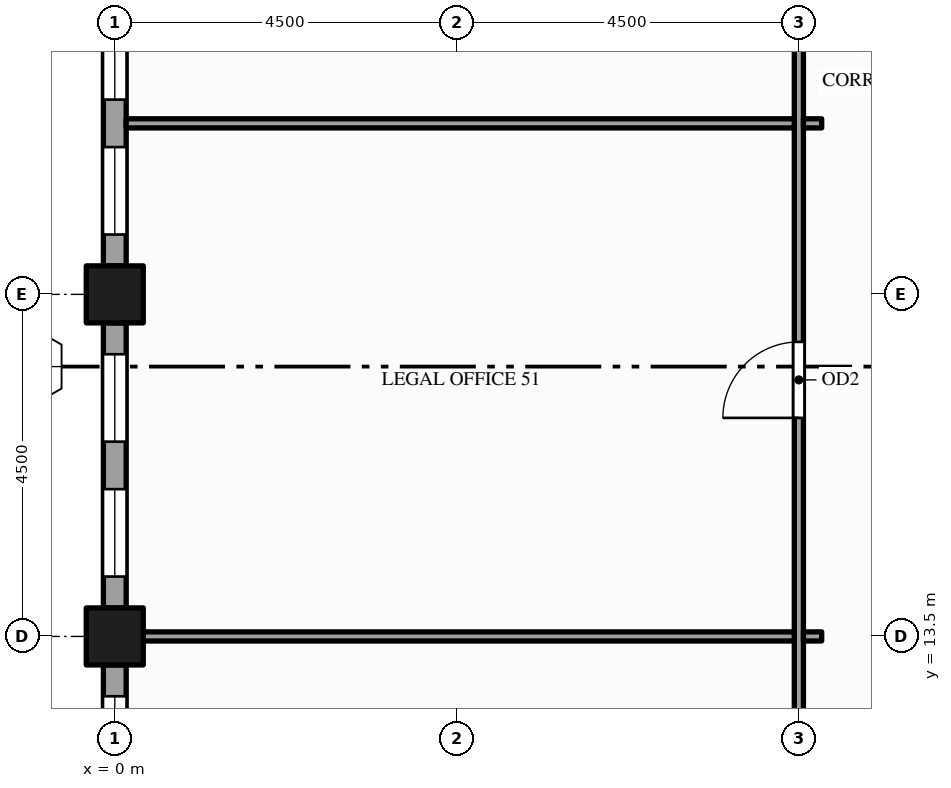
"""IFC4 building model, lengths in metres.
Left out: names, types, materials, properties, quantities, classifications, styles, units other than length and angle.
Written with IfcOpenShell. Run it as: python <this file> out.ifc"""

import sys

from ifc_helpers import new_model, si_unit, direction, frame, frame_2d, origin, origin_2d, place, context, subcontext, project, spatial, rectangle, hollow_rectangle, extrude, element, fill, save


model = new_model("IFC4")
c1 = context("Model", 3, precision=1e-05, world=origin(), true_north=direction((0.0, 1.0)))
c2 = subcontext(c1, "Body", "Model", "MODEL_VIEW")
j1 = project(units=[si_unit("LENGTHUNIT", "METRE"), si_unit("PLANEANGLEUNIT", "RADIAN")], contexts=[c1])
p1 = place(None, origin())
s1 = spatial("IfcSite", under=j1, at=p1, CompositionType="ELEMENT")
p2 = place(p1, origin())
s2 = spatial("IfcBuilding", under=s1, at=p2, CompositionType="ELEMENT")
p3 = place(p2, frame((0.0, 0.0, 223.0)))
s3 = spatial("IfcBuildingStorey", under=s2, at=p3, CompositionType="ELEMENT", Elevation=223.0)
for number, where, z_axis, x_axis in (
    (1, (0.0, 13.5, -0.15), (0.0, 0.0, 1.0), (1.0, 0.0, 0.0)),
    (2, (0.0, 18.0, -0.15), (0.0, 0.0, 1.0), (1.0, 0.0, 0.0)),
):
    element("IfcColumn", number, at=place(p3, frame(where, z_axis=z_axis, x_axis=x_axis)), inside=s3, PredefinedType="COLUMN", context=c2, shape_type="SweptSolid", body=[
        extrude(hollow_rectangle(XDim=0.75, YDim=0.75, WallThickness=0.036, at=origin_2d()), origin(), (0.0, 0.0, 1.0), 4.0),
    ])
p4 = place(p3, frame((0.0, 22.125, 0.0), z_axis=(0.0, 0.0, 1.0), x_axis=(0.0, -1.0, 0.0)))
e3 = element("IfcWall", 3, at=p4, inside=s3, PredefinedType="STANDARD", context=c2, shape_type="SweptSolid", body=[
    extrude(rectangle(XDim=3.75, YDim=0.3, at=frame_2d((1.875, 0.0))), origin(), (0.0, 0.0, 1.0), 3.157),
])
p5 = place(p4, frame((0.413, 0.0, 0.9)))
e4 = element("IfcOpeningElement", 4, at=p5, cuts=e3, PredefinedType="OPENING", context=c2, shape_type="SweptSolid", body=[
    extrude(rectangle(XDim=1.15, YDim=2.0, at=frame_2d((0.575, 1.0))), frame((0.0, 0.16, 0.0), z_axis=(0.0, -1.0, 0.0), x_axis=(1.0, 0.0, 0.0)), (0.0, 0.0, 1.0), 0.32),
])
p6 = place(p4, frame((2.188, 0.0, 0.9)))
e5 = element("IfcOpeningElement", 5, at=p6, cuts=e3, PredefinedType="OPENING", context=c2, shape_type="SweptSolid", body=[
    extrude(rectangle(XDim=1.15, YDim=2.0, at=frame_2d((0.575, 1.0))), frame((0.0, 0.16, 0.0), z_axis=(0.0, -1.0, 0.0), x_axis=(1.0, 0.0, 0.0)), (0.0, 0.0, 1.0), 0.32),
])
p7 = place(p3, frame((0.0, 17.625, 0.0), z_axis=(0.0, 0.0, 1.0), x_axis=(0.0, -1.0, 0.0)))
e6 = element("IfcWall", 6, at=p7, inside=s3, PredefinedType="STANDARD", context=c2, shape_type="SweptSolid", body=[
    extrude(rectangle(XDim=3.75, YDim=0.3, at=frame_2d((1.875, 0.0))), origin(), (0.0, 0.0, 1.0), 3.157),
])
p8 = place(p7, frame((0.413, 0.0, 0.9)))
e7 = element("IfcOpeningElement", 7, at=p8, cuts=e6, PredefinedType="OPENING", context=c2, shape_type="SweptSolid", body=[
    extrude(rectangle(XDim=1.15, YDim=2.0, at=frame_2d((0.575, 1.0))), frame((0.0, 0.16, 0.0), z_axis=(0.0, -1.0, 0.0), x_axis=(1.0, 0.0, 0.0)), (0.0, 0.0, 1.0), 0.32),
])
p9 = place(p7, frame((2.188, 0.0, 0.9)))
e8 = element("IfcOpeningElement", 8, at=p9, cuts=e6, PredefinedType="OPENING", context=c2, shape_type="SweptSolid", body=[
    extrude(rectangle(XDim=1.15, YDim=2.0, at=frame_2d((0.575, 1.0))), frame((0.0, 0.16, 0.0), z_axis=(0.0, -1.0, 0.0), x_axis=(1.0, 0.0, 0.0)), (0.0, 0.0, 1.0), 0.32),
])
p10 = place(p3, frame((0.0, 13.125, 0.0), z_axis=(0.0, 0.0, 1.0), x_axis=(0.0, -1.0, 0.0)))
e9 = element("IfcWall", 9, at=p10, inside=s3, PredefinedType="STANDARD", context=c2, shape_type="SweptSolid", body=[
    extrude(rectangle(XDim=3.75, YDim=0.3, at=frame_2d((1.875, 0.0))), origin(), (0.0, 0.0, 1.0), 3.157),
])
p11 = place(p10, frame((0.413, 0.0, 0.9)))
e10 = element("IfcOpeningElement", 10, at=p11, cuts=e9, PredefinedType="OPENING", context=c2, shape_type="SweptSolid", body=[
    extrude(rectangle(XDim=1.15, YDim=2.0, at=frame_2d((0.575, 1.0))), frame((0.0, 0.16, 0.0), z_axis=(0.0, -1.0, 0.0), x_axis=(1.0, 0.0, 0.0)), (0.0, 0.0, 1.0), 0.32),
])
p12 = place(p10, frame((2.188, 0.0, 0.9)))
e11 = element("IfcOpeningElement", 11, at=p12, cuts=e9, PredefinedType="OPENING", context=c2, shape_type="SweptSolid", body=[
    extrude(rectangle(XDim=1.15, YDim=2.0, at=frame_2d((0.575, 1.0))), frame((0.0, 0.16, 0.0), z_axis=(0.0, -1.0, 0.0), x_axis=(1.0, 0.0, 0.0)), (0.0, 0.0, 1.0), 0.32),
])
p13 = place(p3, frame((9.0, 8.7, 0.0), z_axis=(0.0, 0.0, 1.0), x_axis=(0.0, 1.0, 0.0)))
e12 = element("IfcWall", 12, at=p13, inside=s3, PredefinedType="PARTITIONING", context=c2, shape_type="SweptSolid", body=[
    extrude(rectangle(XDim=23.1, YDim=0.12, at=frame_2d((11.55, 0.0))), origin(), (0.0, 0.0, 1.0), 2.6),
])
p14 = place(p13, frame((2.05, 0.0, 0.0)))
e13 = element("IfcOpeningElement", 13, at=p14, cuts=e12, PredefinedType="OPENING", context=c2, shape_type="SweptSolid", body=[
    extrude(rectangle(XDim=1.0, YDim=2.1, at=frame_2d((0.5, 1.05))), frame((0.0, 0.07, 0.0), z_axis=(0.0, -1.0, 0.0), x_axis=(1.0, 0.0, 0.0)), (0.0, 0.0, 1.0), 0.14),
])
p15 = place(p13, frame((7.675, 0.0, 0.0)))
e14 = element("IfcOpeningElement", 14, at=p15, cuts=e12, PredefinedType="OPENING", context=c2, shape_type="SweptSolid", body=[
    extrude(rectangle(XDim=1.0, YDim=2.1, at=frame_2d((0.5, 1.05))), frame((0.0, 0.07, 0.0), z_axis=(0.0, -1.0, 0.0), x_axis=(1.0, 0.0, 0.0)), (0.0, 0.0, 1.0), 0.14),
])
p16 = place(p13, frame((14.455, 0.0, 0.0)))
e15 = element("IfcOpeningElement", 15, at=p16, cuts=e12, PredefinedType="OPENING", context=c2, shape_type="SweptSolid", body=[
    extrude(rectangle(XDim=1.0, YDim=2.1, at=frame_2d((0.5, 1.05))), frame((0.0, 0.07, 0.0), z_axis=(0.0, -1.0, 0.0), x_axis=(1.0, 0.0, 0.0)), (0.0, 0.0, 1.0), 0.14),
])
p17 = place(p3, frame((0.15, 13.5, 0.0), z_axis=(0.0, 0.0, 1.0), x_axis=(1.0, 0.0, 0.0)))
e16 = element("IfcWall", 16, at=p17, inside=s3, PredefinedType="PARTITIONING", context=c2, shape_type="SweptSolid", body=[
    extrude(rectangle(XDim=8.79, YDim=0.12, at=frame_2d((4.395, 0.0))), origin(), (0.0, 0.0, 1.0), 2.87),
])
p18 = place(p3, frame((9.06, 13.5, 0.0), z_axis=(0.0, 0.0, 1.0), x_axis=(1.0, 0.0, 0.0)))
e17 = element("IfcWall", 17, at=p18, inside=s3, PredefinedType="PARTITIONING", context=c2, shape_type="SweptSolid", body=[
    extrude(rectangle(XDim=0.24, YDim=0.12, at=frame_2d((0.12, 0.0))), origin(), (0.0, 0.0, 1.0), 2.87),
])
p19 = place(p3, frame((0.15, 20.25, 0.0), z_axis=(0.0, 0.0, 1.0), x_axis=(1.0, 0.0, 0.0)))
e18 = element("IfcWall", 18, at=p19, inside=s3, PredefinedType="PARTITIONING", context=c2, shape_type="SweptSolid", body=[
    extrude(rectangle(XDim=8.79, YDim=0.12, at=frame_2d((4.395, 0.0))), origin(), (0.0, 0.0, 1.0), 2.87),
])
p20 = place(p3, frame((9.06, 20.25, 0.0), z_axis=(0.0, 0.0, 1.0), x_axis=(1.0, 0.0, 0.0)))
e19 = element("IfcWall", 19, at=p20, inside=s3, PredefinedType="PARTITIONING", context=c2, shape_type="SweptSolid", body=[
    extrude(rectangle(XDim=0.24, YDim=0.12, at=frame_2d((0.12, 0.0))), origin(), (0.0, 0.0, 1.0), 2.87),
])
p21 = place(p5, origin())
e20 = element("IfcWindow", 20, at=p21, inside=s3, PartitioningType="SINGLE_PANEL", PredefinedType="WINDOW", context=c2, shape_type="SweptSolid", body=[
    extrude(rectangle(XDim=1.15, YDim=2.0, at=frame_2d((0.575, 1.0))), frame((0.0, 0.03, 0.0), z_axis=(0.0, -1.0, 0.0), x_axis=(1.0, 0.0, 0.0)), (0.0, 0.0, 1.0), 0.06),
])
fill(e4, e20)
p22 = place(p6, origin())
e21 = element("IfcWindow", 21, at=p22, inside=s3, PartitioningType="SINGLE_PANEL", PredefinedType="WINDOW", context=c2, shape_type="SweptSolid", body=[
    extrude(rectangle(XDim=1.15, YDim=2.0, at=frame_2d((0.575, 1.0))), frame((0.0, 0.03, 0.0), z_axis=(0.0, -1.0, 0.0), x_axis=(1.0, 0.0, 0.0)), (0.0, 0.0, 1.0), 0.06),
])
fill(e5, e21)
p23 = place(p8, origin())
e22 = element("IfcWindow", 22, at=p23, inside=s3, PartitioningType="SINGLE_PANEL", PredefinedType="WINDOW", context=c2, shape_type="SweptSolid", body=[
    extrude(rectangle(XDim=1.15, YDim=2.0, at=frame_2d((0.575, 1.0))), frame((0.0, 0.03, 0.0), z_axis=(0.0, -1.0, 0.0), x_axis=(1.0, 0.0, 0.0)), (0.0, 0.0, 1.0), 0.06),
])
fill(e7, e22)
p24 = place(p9, origin())
e23 = element("IfcWindow", 23, at=p24, inside=s3, PartitioningType="SINGLE_PANEL", PredefinedType="WINDOW", context=c2, shape_type="SweptSolid", body=[
    extrude(rectangle(XDim=1.15, YDim=2.0, at=frame_2d((0.575, 1.0))), frame((0.0, 0.03, 0.0), z_axis=(0.0, -1.0, 0.0), x_axis=(1.0, 0.0, 0.0)), (0.0, 0.0, 1.0), 0.06),
])
fill(e8, e23)
p25 = place(p11, origin())
e24 = element("IfcWindow", 24, at=p25, inside=s3, PartitioningType="SINGLE_PANEL", PredefinedType="WINDOW", context=c2, shape_type="SweptSolid", body=[
    extrude(rectangle(XDim=1.15, YDim=2.0, at=frame_2d((0.575, 1.0))), frame((0.0, 0.03, 0.0), z_axis=(0.0, -1.0, 0.0), x_axis=(1.0, 0.0, 0.0)), (0.0, 0.0, 1.0), 0.06),
])
fill(e10, e24)
p26 = place(p15, origin())
e25 = element("IfcDoor", 25, at=p26, inside=s3, OperationType="SINGLE_SWING_LEFT", PredefinedType="DOOR", context=c2, shape_type="SweptSolid", body=[
    extrude(rectangle(XDim=1.0, YDim=2.1, at=frame_2d((0.5, 1.05))), frame((0.0, 0.025, 0.0), z_axis=(0.0, -1.0, 0.0), x_axis=(1.0, 0.0, 0.0)), (0.0, 0.0, 1.0), 0.05),
])
fill(e14, e25)
save(model, sys.argv[1])
